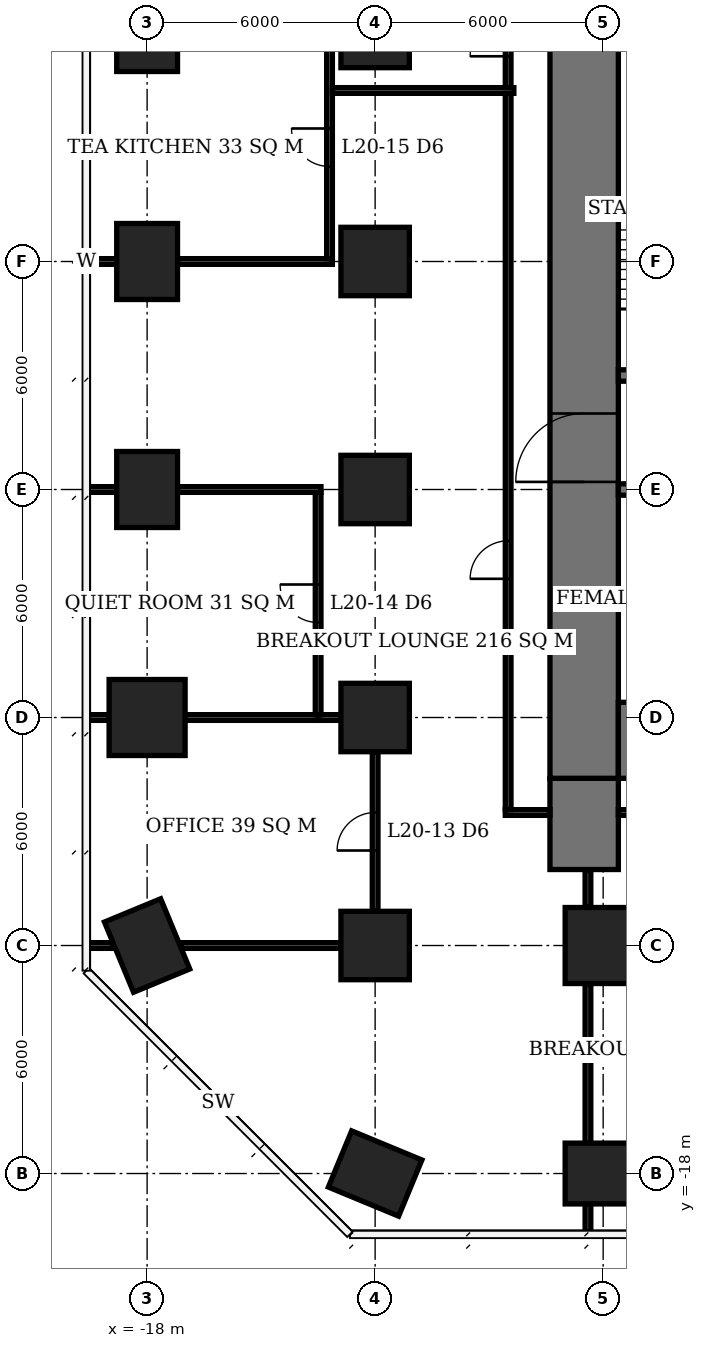
"""IFC4 building model, lengths in metres.
Left out: names, types, materials, properties, quantities, classifications, styles, units other than length and angle.
Written with IfcOpenShell. Run it as: python <this file> out.ifc"""

import sys

from ifc_helpers import new_model, si_unit, direction, frame, frame_2d, origin, origin_2d, place, context, subcontext, project, spatial, rectangle, extrude, element, fill, save


model = new_model("IFC4")
c1 = context("Model", 3, precision=1e-05, world=origin(), true_north=direction((0.0, 1.0)))
c2 = subcontext(c1, "Body", "Model", "MODEL_VIEW")
j1 = project(units=[si_unit("LENGTHUNIT", "METRE"), si_unit("PLANEANGLEUNIT", "RADIAN")], contexts=[c1])
p1 = place(None, origin())
s1 = spatial("IfcSite", under=j1, at=p1, CompositionType="ELEMENT")
p2 = place(p1, origin())
s2 = spatial("IfcBuilding", under=s1, at=p2, CompositionType="ELEMENT")
p3 = place(p2, frame((0.0, 0.0, 84.5)))
s3 = spatial("IfcBuildingStorey", under=s2, at=p3, CompositionType="ELEMENT", Elevation=84.5)
p4 = place(p3, frame((-18.0, -12.0, 0.0), z_axis=(0.0, 0.0, 1.0), x_axis=(-0.382683432365, 0.923879532511, 0.0)))
e1 = element("IfcColumn", 1, at=p4, inside=s3, PredefinedType="COLUMN", context=c2, shape_type="SweptSolid", body=[
    extrude(rectangle(XDim=2.0, YDim=1.6, at=origin_2d()), origin(), (0.0, 0.0, 1.0), 3.9),
])
p5 = place(p3, frame((-18.0, -6.0, 0.0), z_axis=(0.0, 0.0, 1.0), x_axis=(1.0, 0.0, 0.0)))
e2 = element("IfcColumn", 2, at=p5, inside=s3, PredefinedType="COLUMN", context=c2, shape_type="SweptSolid", body=[
    extrude(rectangle(XDim=2.0, YDim=2.0, at=origin_2d()), origin(), (0.0, 0.0, 1.0), 3.9),
])
for number, where, z_axis, x_axis in (
    (3, (-18.0, 0.0, 0.0), (0.0, 0.0, 1.0), (0.0, 1.0, 0.0)),
    (4, (-18.0, 6.0, 0.0), (0.0, 0.0, 1.0), (0.0, 1.0, 0.0)),
    (5, (-18.0, 12.0, 0.0), (0.0, 0.0, 1.0), (0.0, 1.0, 0.0)),
    (6, (-12.0, -18.0, 0.0), (0.0, 0.0, 1.0), (-0.924, 0.383, 0.0)),
):
    element("IfcColumn", number, at=place(p3, frame(where, z_axis=z_axis, x_axis=x_axis)), inside=s3, PredefinedType="COLUMN", context=c2, shape_type="SweptSolid", body=[
        extrude(rectangle(XDim=2.0, YDim=1.6, at=origin_2d()), origin(), (0.0, 0.0, 1.0), 3.9),
    ])
for number, where, z_axis, x_axis in (
    (7, (-12.0, -12.0, 0.0), (0.0, 0.0, 1.0), (1.0, 0.0, 0.0)),
    (8, (-12.0, -6.0, 0.0), (0.0, 0.0, 1.0), (1.0, 0.0, 0.0)),
    (9, (-12.0, 0.0, 0.0), (0.0, 0.0, 1.0), (1.0, 0.0, 0.0)),
    (10, (-12.0, 6.0, 0.0), (0.0, 0.0, 1.0), (1.0, 0.0, 0.0)),
    (11, (-12.0, 12.0, 0.0), (0.0, 0.0, 1.0), (1.0, 0.0, 0.0)),
):
    element("IfcColumn", number, at=place(p3, frame(where, z_axis=z_axis, x_axis=x_axis)), inside=s3, PredefinedType="COLUMN", context=c2, shape_type="SweptSolid", body=[
        extrude(rectangle(XDim=1.8, YDim=1.8, at=origin_2d()), origin(), (0.0, 0.0, 1.0), 3.9),
    ])
p6 = place(p3, frame((-6.0, -18.0, 0.0), z_axis=(0.0, 0.0, 1.0), x_axis=(1.0, 0.0, 0.0)))
e12 = element("IfcColumn", 12, at=p6, inside=s3, PredefinedType="COLUMN", context=c2, shape_type="SweptSolid", body=[
    extrude(rectangle(XDim=2.0, YDim=1.6, at=origin_2d()), origin(), (0.0, 0.0, 1.0), 3.9),
])
p7 = place(p3, frame((-6.0, -12.0, 0.0), z_axis=(0.0, 0.0, 1.0), x_axis=(1.0, 0.0, 0.0)))
e13 = element("IfcColumn", 13, at=p7, inside=s3, PredefinedType="COLUMN", context=c2, shape_type="SweptSolid", body=[
    extrude(rectangle(XDim=2.0, YDim=2.0, at=origin_2d()), origin(), (0.0, 0.0, 1.0), 3.9),
])
p8 = place(p3, frame((-5.6, -6.6, 0.0), z_axis=(0.0, 0.0, 1.0), x_axis=(1.0, 0.0, 0.0)))
e14 = element("IfcWall", 14, at=p8, inside=s3, PredefinedType="SHEAR", context=c2, shape_type="SweptSolid", body=[
    extrude(rectangle(XDim=23.2, YDim=2.0, at=frame_2d((11.6, 0.0))), origin(), (0.0, 0.0, 1.0), 3.9),
])
p9 = place(p3, frame((-6.5, -7.6, 0.0), z_axis=(0.0, 0.0, 1.0), x_axis=(0.0, 1.0, 0.0)))
e15 = element("IfcWall", 15, at=p9, inside=s3, PredefinedType="SHEAR", context=c2, shape_type="SweptSolid", body=[
    extrude(rectangle(XDim=21.2, YDim=1.8, at=frame_2d((10.6, 0.0))), origin(), (0.0, 0.0, 1.0), 3.9),
])
p10 = place(p9, frame((7.8, 0.0, 0.0)))
e16 = element("IfcOpeningElement", 16, at=p10, cuts=e15, PredefinedType="OPENING", context=c2, shape_type="SweptSolid", body=[
    extrude(rectangle(XDim=1.8, YDim=2.4, at=frame_2d((0.9, 1.2))), frame((0.0, 0.91, 0.0), z_axis=(0.0, -1.0, 0.0), x_axis=(1.0, 0.0, 0.0)), (0.0, 0.0, 1.0), 1.82),
])
p11 = place(p3, frame((-6.5, -10.0, 0.0), z_axis=(0.0, 0.0, 1.0), x_axis=(0.0, 1.0, 0.0)))
e17 = element("IfcWall", 17, at=p11, inside=s3, PredefinedType="SHEAR", context=c2, shape_type="SweptSolid", body=[
    extrude(rectangle(XDim=2.4, YDim=1.8, at=frame_2d((1.2, 0.0))), origin(), (0.0, 0.0, 1.0), 3.9),
])
p12 = place(p3, frame((-5.6, 0.0, 0.0), z_axis=(0.0, 0.0, 1.0), x_axis=(1.0, 0.0, 0.0)))
e18 = element("IfcWall", 18, at=p12, inside=s3, PredefinedType="SHEAR", context=c2, shape_type="SweptSolid", body=[
    extrude(rectangle(XDim=17.75, YDim=0.3, at=frame_2d((8.875, 0.0))), origin(), (0.0, 0.0, 1.0), 3.9),
])
p13 = place(p12, frame((0.6, 0.0, 0.0)))
e19 = element("IfcOpeningElement", 19, at=p13, cuts=e18, PredefinedType="OPENING", context=c2, shape_type="SweptSolid", body=[
    extrude(rectangle(XDim=0.9, YDim=2.1, at=frame_2d((0.45, 1.05))), frame((0.0, 0.16, 0.0), z_axis=(0.0, -1.0, 0.0), x_axis=(1.0, 0.0, 0.0)), (0.0, 0.0, 1.0), 0.32),
])
p14 = place(p12, frame((3.7, 0.0, 0.0)))
e20 = element("IfcOpeningElement", 20, at=p14, cuts=e18, PredefinedType="OPENING", context=c2, shape_type="SweptSolid", body=[
    extrude(rectangle(XDim=1.0, YDim=2.1, at=frame_2d((0.5, 1.05))), frame((0.0, 0.16, 0.0), z_axis=(0.0, -1.0, 0.0), x_axis=(1.0, 0.0, 0.0)), (0.0, 0.0, 1.0), 0.32),
])
p15 = place(p3, frame((-5.6, 3.0, 0.0), z_axis=(0.0, 0.0, 1.0), x_axis=(1.0, 0.0, 0.0)))
e21 = element("IfcWall", 21, at=p15, inside=s3, PredefinedType="SHEAR", context=c2, shape_type="SweptSolid", body=[
    extrude(rectangle(XDim=5.45, YDim=0.3, at=frame_2d((2.725, 0.0))), origin(), (0.0, 0.0, 1.0), 3.9),
])
p16 = place(p15, frame((0.4, 0.0, 0.0)))
e22 = element("IfcOpeningElement", 22, at=p16, cuts=e21, PredefinedType="OPENING", context=c2, shape_type="SweptSolid", body=[
    extrude(rectangle(XDim=1.2, YDim=2.1, at=frame_2d((0.6, 1.05))), frame((0.0, 0.16, 0.0), z_axis=(0.0, -1.0, 0.0), x_axis=(1.0, 0.0, 0.0)), (0.0, 0.0, 1.0), 0.32),
])
p17 = place(p15, frame((3.95, 0.0, 0.0)))
e23 = element("IfcOpeningElement", 23, at=p17, cuts=e21, PredefinedType="OPENING", context=c2, shape_type="SweptSolid", body=[
    extrude(rectangle(XDim=0.9, YDim=2.1, at=frame_2d((0.45, 1.05))), frame((0.0, 0.16, 0.0), z_axis=(0.0, -1.0, 0.0), x_axis=(1.0, 0.0, 0.0)), (0.0, 0.0, 1.0), 0.32),
])
p18 = place(p3, frame((-19.6, -12.0, 0.0), z_axis=(0.0, 0.0, 1.0), x_axis=(1.0, 0.0, 0.0)))
e24 = element("IfcWall", 24, at=p18, inside=s3, PredefinedType="PARTITIONING", context=c2, shape_type="SweptSolid", body=[
    extrude(rectangle(XDim=0.703, YDim=0.15, at=frame_2d((0.352, 0.0))), origin(), (0.0, 0.0, 1.0), 3.65),
])
p19 = place(p3, frame((-17.103, -12.0, 0.0), z_axis=(0.0, 0.0, 1.0), x_axis=(1.0, 0.0, 0.0)))
e25 = element("IfcWall", 25, at=p19, inside=s3, PredefinedType="PARTITIONING", context=c2, shape_type="SweptSolid", body=[
    extrude(rectangle(XDim=4.203, YDim=0.15, at=frame_2d((2.102, 0.0))), origin(), (0.0, 0.0, 1.0), 3.65),
])
p20 = place(p3, frame((-19.6, -6.0, 0.0), z_axis=(0.0, 0.0, 1.0), x_axis=(1.0, 0.0, 0.0)))
e26 = element("IfcWall", 26, at=p20, inside=s3, PredefinedType="PARTITIONING", context=c2, shape_type="SweptSolid", body=[
    extrude(rectangle(XDim=0.6, YDim=0.15, at=frame_2d((0.3, 0.0))), origin(), (0.0, 0.0, 1.0), 2.15),
])
p21 = place(p3, frame((-17.0, -6.0, 0.0), z_axis=(0.0, 0.0, 1.0), x_axis=(1.0, 0.0, 0.0)))
e27 = element("IfcWall", 27, at=p21, inside=s3, PredefinedType="PARTITIONING", context=c2, shape_type="SweptSolid", body=[
    extrude(rectangle(XDim=3.575, YDim=0.15, at=frame_2d((1.788, 0.0))), origin(), (0.0, 0.0, 1.0), 3.65),
])
p22 = place(p3, frame((-13.5, -6.0, 0.0), z_axis=(0.0, 0.0, 1.0), x_axis=(1.0, 0.0, 0.0)))
e28 = element("IfcWall", 28, at=p22, inside=s3, PredefinedType="PARTITIONING", context=c2, shape_type="SweptSolid", body=[
    extrude(rectangle(XDim=0.6, YDim=0.15, at=frame_2d((0.3, 0.0))), origin(), (0.0, 0.0, 1.0), 3.65),
])
p23 = place(p3, frame((-19.6, 0.0, 0.0), z_axis=(0.0, 0.0, 1.0), x_axis=(1.0, 0.0, 0.0)))
e29 = element("IfcWall", 29, at=p23, inside=s3, PredefinedType="PARTITIONING", context=c2, shape_type="SweptSolid", body=[
    extrude(rectangle(XDim=0.8, YDim=0.15, at=frame_2d((0.4, 0.0))), origin(), (0.0, 0.0, 1.0), 2.15),
])
p24 = place(p3, frame((-17.2, 0.0, 0.0), z_axis=(0.0, 0.0, 1.0), x_axis=(1.0, 0.0, 0.0)))
e30 = element("IfcWall", 30, at=p24, inside=s3, PredefinedType="PARTITIONING", context=c2, shape_type="SweptSolid", body=[
    extrude(rectangle(XDim=3.775, YDim=0.15, at=frame_2d((1.887, 0.0))), origin(), (0.0, 0.0, 1.0), 3.65),
])
p25 = place(p3, frame((-19.55, 6.0, 0.0), z_axis=(0.0, 0.0, 1.0), x_axis=(1.0, 0.0, 0.0)))
e31 = element("IfcWall", 31, at=p25, inside=s3, PredefinedType="PARTITIONING", context=c2, shape_type="SweptSolid", body=[
    extrude(rectangle(XDim=0.75, YDim=0.15, at=frame_2d((0.375, 0.0))), origin(), (0.0, 0.0, 1.0), 2.15),
])
p26 = place(p3, frame((-17.2, 6.0, 0.0), z_axis=(0.0, 0.0, 1.0), x_axis=(1.0, 0.0, 0.0)))
e32 = element("IfcWall", 32, at=p26, inside=s3, PredefinedType="PARTITIONING", context=c2, shape_type="SweptSolid", body=[
    extrude(rectangle(XDim=4.075, YDim=0.15, at=frame_2d((2.038, 0.0))), origin(), (0.0, 0.0, 1.0), 3.65),
])
p27 = place(p3, frame((-13.5, -5.925, 0.0), z_axis=(0.0, 0.0, 1.0), x_axis=(0.0, 1.0, 0.0)))
e33 = element("IfcWall", 33, at=p27, inside=s3, PredefinedType="PARTITIONING", context=c2, shape_type="SweptSolid", body=[
    extrude(rectangle(XDim=5.85, YDim=0.15, at=frame_2d((2.925, 0.0))), origin(), (0.0, 0.0, 1.0), 3.65),
])
p28 = place(p27, frame((2.425, 0.0, 0.0)))
e34 = element("IfcOpeningElement", 34, at=p28, cuts=e33, PredefinedType="OPENING", context=c2, shape_type="SweptSolid", body=[
    extrude(rectangle(XDim=1.0, YDim=2.1, at=frame_2d((0.5, 1.05))), frame((0.0, 0.085, 0.0), z_axis=(0.0, -1.0, 0.0), x_axis=(1.0, 0.0, 0.0)), (0.0, 0.0, 1.0), 0.17),
])
p29 = place(p3, frame((-13.2, 6.075, 0.0), z_axis=(0.0, 0.0, 1.0), x_axis=(0.0, 1.0, 0.0)))
e35 = element("IfcWall", 35, at=p29, inside=s3, PredefinedType="PARTITIONING", context=c2, shape_type="SweptSolid", body=[
    extrude(rectangle(XDim=5.85, YDim=0.15, at=frame_2d((2.925, 0.0))), origin(), (0.0, 0.0, 1.0), 3.65),
])
p30 = place(p29, frame((2.425, 0.0, 0.0)))
e36 = element("IfcOpeningElement", 36, at=p30, cuts=e35, PredefinedType="OPENING", context=c2, shape_type="SweptSolid", body=[
    extrude(rectangle(XDim=1.0, YDim=2.1, at=frame_2d((0.5, 1.05))), frame((0.0, 0.085, 0.0), z_axis=(0.0, -1.0, 0.0), x_axis=(1.0, 0.0, 0.0)), (0.0, 0.0, 1.0), 0.17),
])
p31 = place(p3, frame((-12.0, -11.1, 0.0), z_axis=(0.0, 0.0, 1.0), x_axis=(0.0, 1.0, 0.0)))
e37 = element("IfcWall", 37, at=p31, inside=s3, PredefinedType="PARTITIONING", context=c2, shape_type="SweptSolid", body=[
    extrude(rectangle(XDim=4.2, YDim=0.15, at=frame_2d((2.1, 0.0))), origin(), (0.0, 0.0, 1.0), 3.65),
])
p32 = place(p31, frame((1.6, 0.0, 0.0)))
e38 = element("IfcOpeningElement", 38, at=p32, cuts=e37, PredefinedType="OPENING", context=c2, shape_type="SweptSolid", body=[
    extrude(rectangle(XDim=1.0, YDim=2.1, at=frame_2d((0.5, 1.05))), frame((0.0, 0.085, 0.0), z_axis=(0.0, -1.0, 0.0), x_axis=(1.0, 0.0, 0.0)), (0.0, 0.0, 1.0), 0.17),
])
p33 = place(p3, frame((-13.125, 10.5, 0.0), z_axis=(0.0, 0.0, 1.0), x_axis=(1.0, 0.0, 0.0)))
e39 = element("IfcWall", 39, at=p33, inside=s3, PredefinedType="PARTITIONING", context=c2, shape_type="SweptSolid", body=[
    extrude(rectangle(XDim=4.775, YDim=0.15, at=frame_2d((2.387, 0.0))), origin(), (0.0, 0.0, 1.0), 3.65),
])
p34 = place(p3, frame((-8.5, -8.425, 0.0), z_axis=(0.0, 0.0, 1.0), x_axis=(0.0, 1.0, 0.0)))
e40 = element("IfcWall", 40, at=p34, inside=s3, PredefinedType="PARTITIONING", context=c2, shape_type="SweptSolid", body=[
    extrude(rectangle(XDim=18.85, YDim=0.15, at=frame_2d((9.425, 0.0))), origin(), (0.0, 0.0, 1.0), 3.65),
])
p35 = place(p34, frame((6.075, 0.0, 0.0)))
e41 = element("IfcOpeningElement", 41, at=p35, cuts=e40, PredefinedType="OPENING", context=c2, shape_type="SweptSolid", body=[
    extrude(rectangle(XDim=1.0, YDim=2.1, at=frame_2d((0.5, 1.05))), frame((0.0, 0.085, 0.0), z_axis=(0.0, -1.0, 0.0), x_axis=(1.0, 0.0, 0.0)), (0.0, 0.0, 1.0), 0.17),
])
p36 = place(p3, frame((-8.575, -8.5, 0.0), z_axis=(0.0, 0.0, 1.0), x_axis=(1.0, 0.0, 0.0)))
e42 = element("IfcWall", 42, at=p36, inside=s3, PredefinedType="PARTITIONING", context=c2, shape_type="SweptSolid", body=[
    extrude(rectangle(XDim=1.175, YDim=0.15, at=frame_2d((0.587, 0.0))), origin(), (0.0, 0.0, 1.0), 3.65),
])
p37 = place(p3, frame((-8.5, 10.575, 0.0), z_axis=(0.0, 0.0, 1.0), x_axis=(0.0, 1.0, 0.0)))
e43 = element("IfcWall", 43, at=p37, inside=s3, PredefinedType="PARTITIONING", context=c2, shape_type="SweptSolid", body=[
    extrude(rectangle(XDim=3.85, YDim=0.15, at=frame_2d((1.925, 0.0))), origin(), (0.0, 0.0, 1.0), 3.65),
])
p38 = place(p37, frame((0.825, 0.0, 0.0)))
e44 = element("IfcOpeningElement", 44, at=p38, cuts=e43, PredefinedType="OPENING", context=c2, shape_type="SweptSolid", body=[
    extrude(rectangle(XDim=1.0, YDim=2.1, at=frame_2d((0.5, 1.05))), frame((0.0, 0.085, 0.0), z_axis=(0.0, -1.0, 0.0), x_axis=(1.0, 0.0, 0.0)), (0.0, 0.0, 1.0), 0.17),
])
p39 = place(p3, frame((-6.4, -19.55, 0.0), z_axis=(0.0, 0.0, 1.0), x_axis=(0.0, 1.0, 0.0)))
e45 = element("IfcWall", 45, at=p39, inside=s3, PredefinedType="PARTITIONING", context=c2, shape_type="SweptSolid", body=[
    extrude(rectangle(XDim=0.75, YDim=0.15, at=frame_2d((0.375, 0.0))), origin(), (0.0, 0.0, 1.0), 3.65),
])
p40 = place(p3, frame((-6.4, -17.2, 0.0), z_axis=(0.0, 0.0, 1.0), x_axis=(0.0, 1.0, 0.0)))
e46 = element("IfcWall", 46, at=p40, inside=s3, PredefinedType="PARTITIONING", context=c2, shape_type="SweptSolid", body=[
    extrude(rectangle(XDim=4.2, YDim=0.15, at=frame_2d((2.1, 0.0))), origin(), (0.0, 0.0, 1.0), 3.65),
])
p41 = place(p3, frame((-6.4, -11.0, 0.0), z_axis=(0.0, 0.0, 1.0), x_axis=(0.0, 1.0, 0.0)))
e47 = element("IfcWall", 47, at=p41, inside=s3, PredefinedType="PARTITIONING", context=c2, shape_type="SweptSolid", body=[
    extrude(rectangle(XDim=1.0, YDim=0.15, at=frame_2d((0.5, 0.0))), origin(), (0.0, 0.0, 1.0), 3.65),
])
p42 = place(p3, frame((-1.575, -8.5, 0.0), z_axis=(0.0, 0.0, 1.0), x_axis=(-1.0, 0.0, 0.0)))
e48 = element("IfcWall", 48, at=p42, inside=s3, PredefinedType="PARTITIONING", context=c2, shape_type="SweptSolid", body=[
    extrude(rectangle(XDim=4.025, YDim=0.15, at=frame_2d((2.013, 0.0))), origin(), (0.0, 0.0, 1.0), 3.65),
])
p43 = place(p42, frame((2.09, 0.0, 0.0)))
e49 = element("IfcOpeningElement", 49, at=p43, cuts=e48, PredefinedType="OPENING", context=c2, shape_type="SweptSolid", body=[
    extrude(rectangle(XDim=1.0, YDim=2.1, at=frame_2d((0.5, 1.05))), frame((0.0, 0.085, 0.0), z_axis=(0.0, -1.0, 0.0), x_axis=(1.0, 0.0, 0.0)), (0.0, 0.0, 1.0), 0.17),
])
p44 = place(p10, origin())
e50 = element("IfcDoor", 50, at=p44, inside=s3, OperationType="DOUBLE_DOOR_SINGLE_SWING", PredefinedType="DOOR", context=c2, shape_type="SweptSolid", body=[
    extrude(rectangle(XDim=1.8, YDim=2.4, at=frame_2d((0.9, 1.2))), frame((0.0, 0.025, 0.0), z_axis=(0.0, -1.0, 0.0), x_axis=(1.0, 0.0, 0.0)), (0.0, 0.0, 1.0), 0.05),
])
fill(e16, e50)
p45 = place(p32, origin())
e51 = element("IfcDoor", 51, at=p45, inside=s3, OperationType="SINGLE_SWING_LEFT", PredefinedType="DOOR", context=c2, shape_type="SweptSolid", body=[
    extrude(rectangle(XDim=1.0, YDim=2.1, at=frame_2d((0.5, 1.05))), frame((0.0, 0.025, 0.0), z_axis=(0.0, -1.0, 0.0), x_axis=(1.0, 0.0, 0.0)), (0.0, 0.0, 1.0), 0.05),
])
fill(e38, e51)
p46 = place(p28, origin())
e52 = element("IfcDoor", 52, at=p46, inside=s3, OperationType="SINGLE_SWING_RIGHT", PredefinedType="DOOR", context=c2, shape_type="SweptSolid", body=[
    extrude(rectangle(XDim=1.0, YDim=2.1, at=frame_2d((0.5, 1.05))), frame((0.0, 0.025, 0.0), z_axis=(0.0, -1.0, 0.0), x_axis=(1.0, 0.0, 0.0)), (0.0, 0.0, 1.0), 0.05),
])
fill(e34, e52)
p47 = place(p30, origin())
e53 = element("IfcDoor", 53, at=p47, inside=s3, OperationType="SINGLE_SWING_RIGHT", PredefinedType="DOOR", context=c2, shape_type="SweptSolid", body=[
    extrude(rectangle(XDim=1.0, YDim=2.1, at=frame_2d((0.5, 1.05))), frame((0.0, 0.025, 0.0), z_axis=(0.0, -1.0, 0.0), x_axis=(1.0, 0.0, 0.0)), (0.0, 0.0, 1.0), 0.05),
])
fill(e36, e53)
p48 = place(p35, origin())
e54 = element("IfcDoor", 54, at=p48, inside=s3, OperationType="SINGLE_SWING_LEFT", PredefinedType="DOOR", context=c2, shape_type="SweptSolid", body=[
    extrude(rectangle(XDim=1.0, YDim=2.1, at=frame_2d((0.5, 1.05))), frame((0.0, 0.025, 0.0), z_axis=(0.0, -1.0, 0.0), x_axis=(1.0, 0.0, 0.0)), (0.0, 0.0, 1.0), 0.05),
])
fill(e41, e54)
p49 = place(p38, origin())
e55 = element("IfcDoor", 55, at=p49, inside=s3, OperationType="SINGLE_SWING_LEFT", PredefinedType="DOOR", context=c2, shape_type="SweptSolid", body=[
    extrude(rectangle(XDim=1.0, YDim=2.1, at=frame_2d((0.5, 1.05))), frame((0.0, 0.025, 0.0), z_axis=(0.0, -1.0, 0.0), x_axis=(1.0, 0.0, 0.0)), (0.0, 0.0, 1.0), 0.05),
])
fill(e44, e55)
save(model, sys.argv[1])
